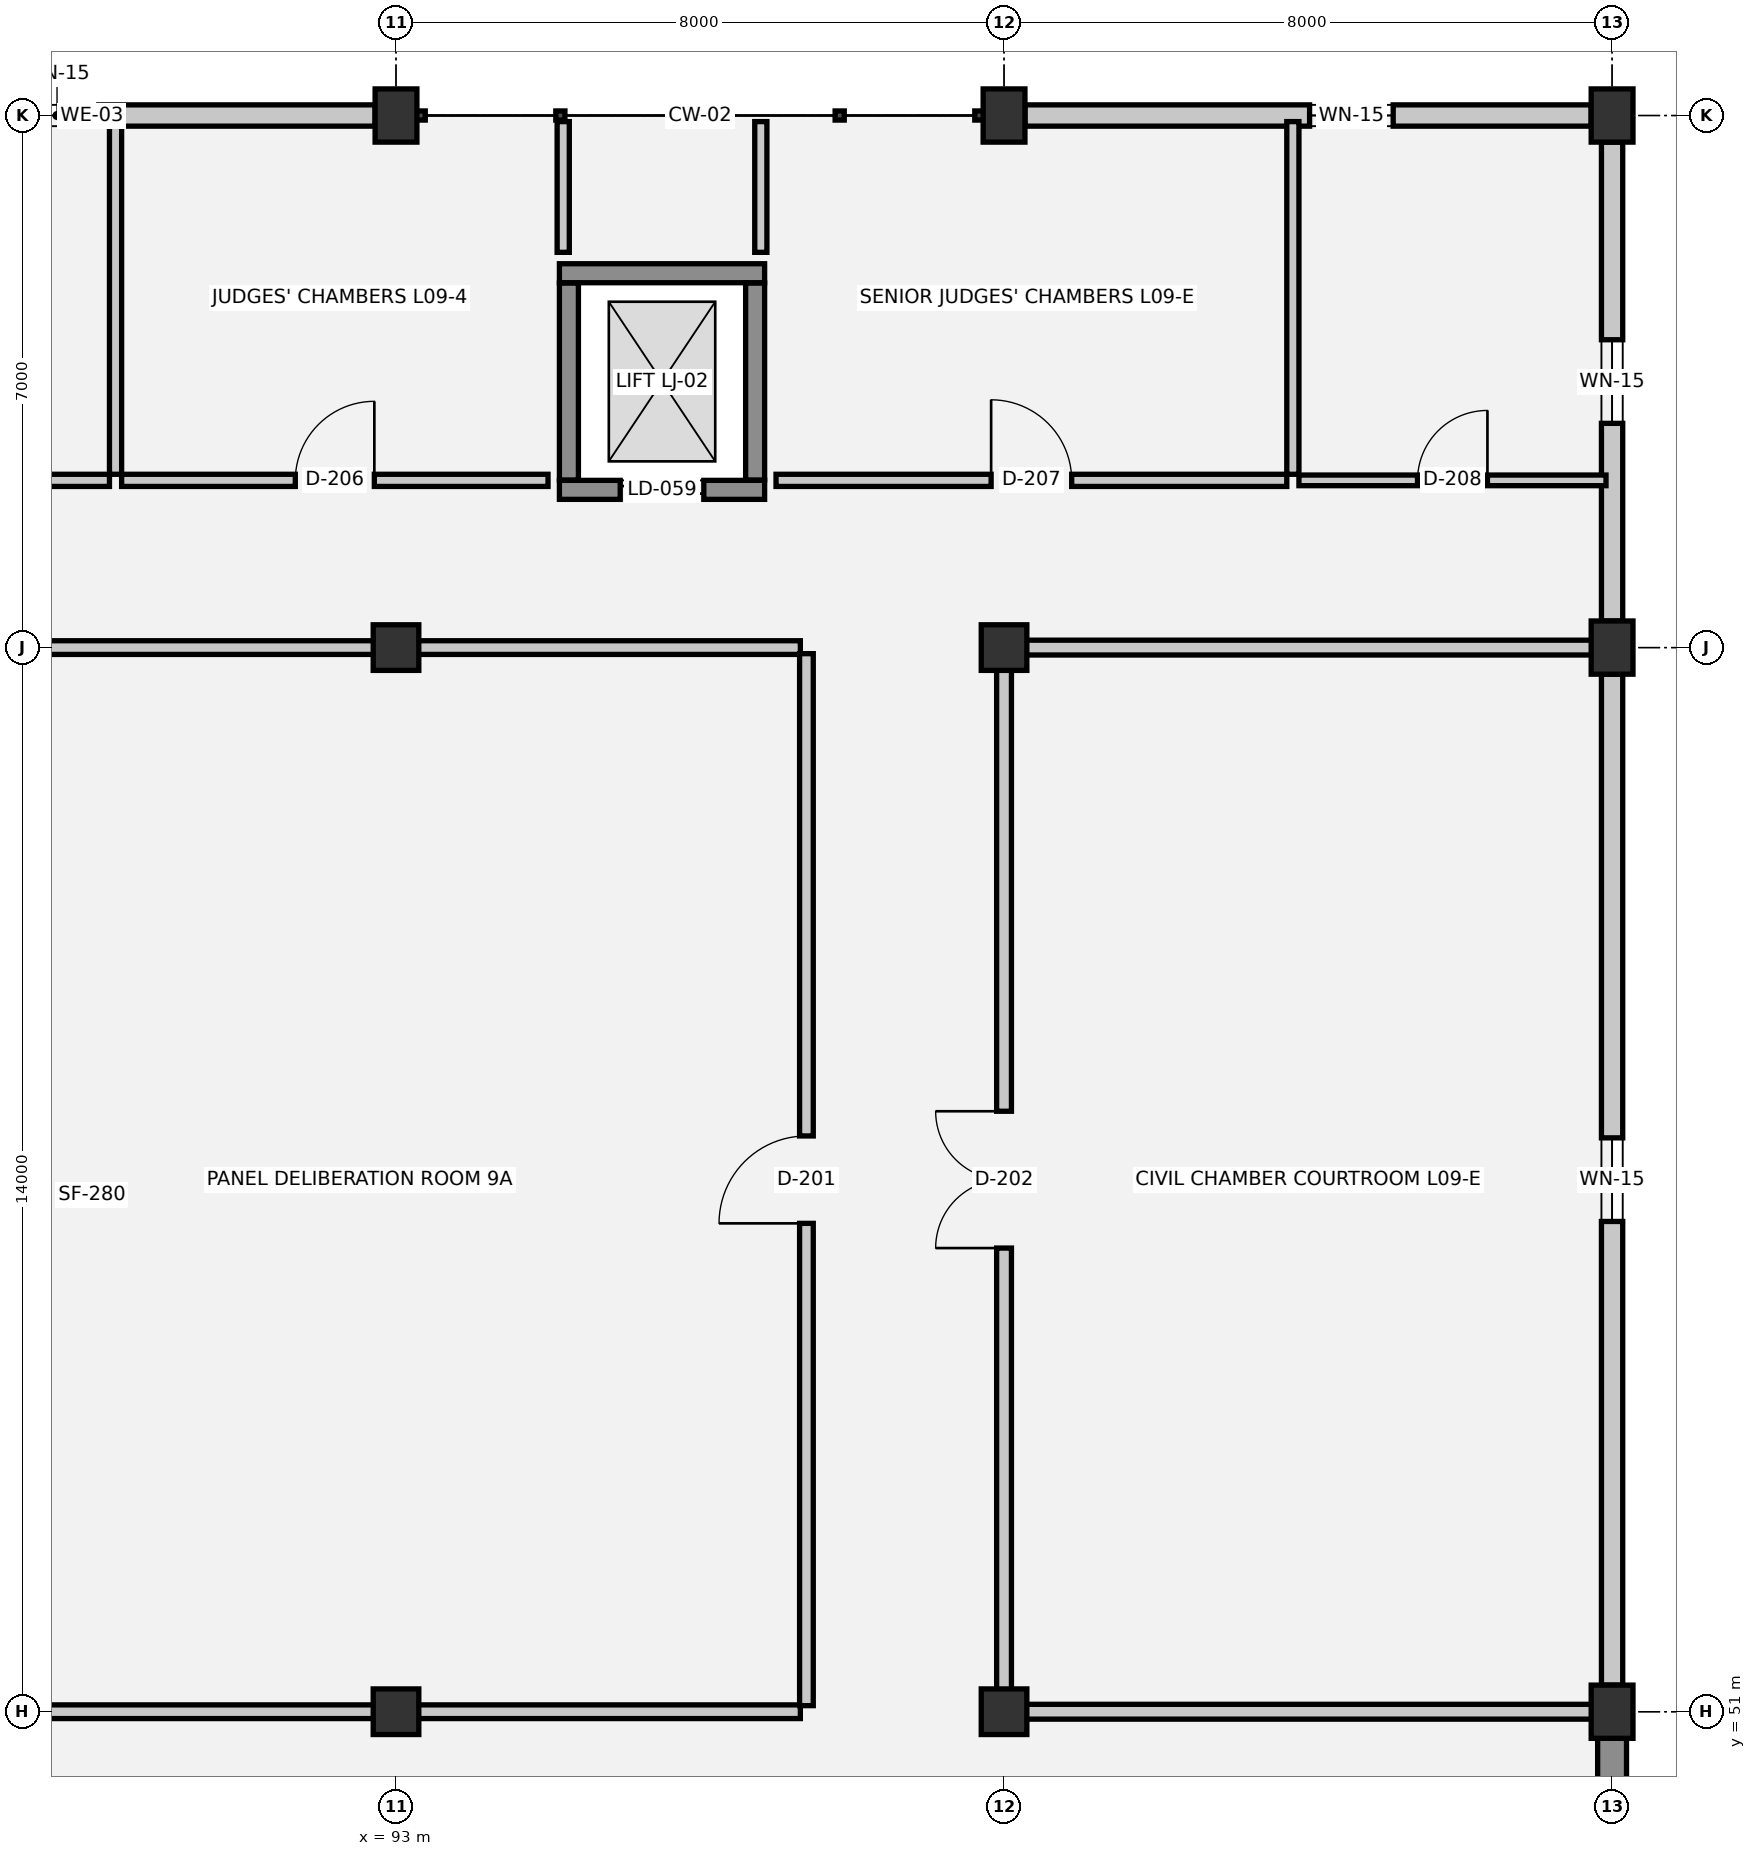
"""IFC4 building model, lengths in metres.
Left out: names, types, materials, properties, quantities, classifications, styles, units other than length and angle.
Written with IfcOpenShell. Run it as: python <this file> out.ifc"""

import sys

from ifc_helpers import new_model, si_unit, direction, frame, frame_2d, origin, origin_2d, place, context, subcontext, project, spatial, rectangle, extrude, element, fill, save


model = new_model("IFC4")
c1 = context("Model", 3, precision=1e-05, world=origin(), true_north=direction((0.0, 1.0)))
c2 = subcontext(c1, "Body", "Model", "MODEL_VIEW")
j1 = project(units=[si_unit("LENGTHUNIT", "METRE"), si_unit("PLANEANGLEUNIT", "RADIAN")], contexts=[c1])
p1 = place(None, origin())
s1 = spatial("IfcSite", under=j1, at=p1, CompositionType="ELEMENT")
p2 = place(p1, origin())
s2 = spatial("IfcBuilding", under=s1, at=p2, CompositionType="ELEMENT")
p3 = place(p2, frame((0.0, 0.0, 33.3)))
s3 = spatial("IfcBuildingStorey", under=s2, at=p3, CompositionType="ELEMENT", Elevation=33.3)
for number, where, z_axis, x_axis in (
    (1, (93.0, 51.0, 0.0), (0.0, 0.0, 1.0), (1.0, 0.0, 0.0)),
    (2, (93.0, 65.0, 0.0), (0.0, 0.0, 1.0), (1.0, 0.0, 0.0)),
):
    element("IfcColumn", number, at=place(p3, frame(where, z_axis=z_axis, x_axis=x_axis)), inside=s3, PredefinedType="COLUMN", context=c2, shape_type="SweptSolid", body=[
        extrude(rectangle(XDim=0.6, YDim=0.6, at=origin_2d()), origin(), (0.0, 0.0, 1.0), 3.75),
    ])
p4 = place(p3, frame((93.0, 72.0, 0.0), z_axis=(0.0, 0.0, 1.0), x_axis=(1.0, 0.0, 0.0)))
e3 = element("IfcColumn", 3, at=p4, inside=s3, PredefinedType="COLUMN", context=c2, shape_type="SweptSolid", body=[
    extrude(rectangle(XDim=0.55, YDim=0.7, at=origin_2d()), origin(), (0.0, 0.0, 1.0), 3.75),
])
for number, where, z_axis, x_axis in (
    (4, (101.0, 51.0, 0.0), (0.0, 0.0, 1.0), (1.0, 0.0, 0.0)),
    (5, (101.0, 65.0, 0.0), (0.0, 0.0, 1.0), (1.0, 0.0, 0.0)),
):
    element("IfcColumn", number, at=place(p3, frame(where, z_axis=z_axis, x_axis=x_axis)), inside=s3, PredefinedType="COLUMN", context=c2, shape_type="SweptSolid", body=[
        extrude(rectangle(XDim=0.6, YDim=0.6, at=origin_2d()), origin(), (0.0, 0.0, 1.0), 3.75),
    ])
for number, where, z_axis, x_axis in (
    (6, (101.0, 72.0, 0.0), (0.0, 0.0, 1.0), (1.0, 0.0, 0.0)),
    (7, (109.0, 51.0, 0.0), (0.0, 0.0, 1.0), (1.0, 0.0, 0.0)),
    (8, (109.0, 65.0, 0.0), (0.0, 0.0, 1.0), (1.0, 0.0, 0.0)),
    (9, (109.0, 72.0, 0.0), (0.0, 0.0, 1.0), (1.0, 0.0, 0.0)),
):
    element("IfcColumn", number, at=place(p3, frame(where, z_axis=z_axis, x_axis=x_axis)), inside=s3, PredefinedType="COLUMN", context=c2, shape_type="SweptSolid", body=[
        extrude(rectangle(XDim=0.55, YDim=0.7, at=origin_2d()), origin(), (0.0, 0.0, 1.0), 3.75),
    ])
p5 = place(p3, frame((85.275, 72.0, 0.0), z_axis=(0.0, 0.0, 1.0), x_axis=(1.0, 0.0, 0.0)))
e10 = element("IfcWall", 10, at=p5, inside=s3, PredefinedType="SOLIDWALL", context=c2, shape_type="SweptSolid", body=[
    extrude(rectangle(XDim=7.45, YDim=0.28, at=frame_2d((3.725, 0.0))), origin(), (0.0, 0.0, 1.0), 2.6),
])
p6 = place(p5, frame((2.715, 0.0, 1.0)))
e11 = element("IfcOpeningElement", 11, at=p6, cuts=e10, PredefinedType="OPENING", context=c2, shape_type="SweptSolid", body=[
    extrude(rectangle(XDim=1.1, YDim=1.2, at=frame_2d((0.55, 0.6))), frame((0.0, 0.15, 0.0), z_axis=(0.0, -1.0, 0.0), x_axis=(1.0, 0.0, 0.0)), (0.0, 0.0, 1.0), 0.3),
])
p7 = place(p3, frame((101.275, 72.0, 0.0), z_axis=(0.0, 0.0, 1.0), x_axis=(1.0, 0.0, 0.0)))
e12 = element("IfcWall", 12, at=p7, inside=s3, PredefinedType="SOLIDWALL", context=c2, shape_type="SweptSolid", body=[
    extrude(rectangle(XDim=7.45, YDim=0.28, at=frame_2d((3.725, 0.0))), origin(), (0.0, 0.0, 1.0), 2.6),
])
p8 = place(p7, frame((3.745, 0.0, 1.0)))
e13 = element("IfcOpeningElement", 13, at=p8, cuts=e12, PredefinedType="OPENING", context=c2, shape_type="SweptSolid", body=[
    extrude(rectangle(XDim=1.1, YDim=1.2, at=frame_2d((0.55, 0.6))), frame((0.0, 0.15, 0.0), z_axis=(0.0, -1.0, 0.0), x_axis=(1.0, 0.0, 0.0)), (0.0, 0.0, 1.0), 0.3),
])
p9 = place(p3, frame((109.0, 71.65, 0.0), z_axis=(0.0, 0.0, 1.0), x_axis=(0.0, -1.0, 0.0)))
e14 = element("IfcWall", 14, at=p9, inside=s3, PredefinedType="SOLIDWALL", context=c2, shape_type="SweptSolid", body=[
    extrude(rectangle(XDim=6.3, YDim=0.28, at=frame_2d((3.15, 0.0))), origin(), (0.0, 0.0, 1.0), 2.6),
])
p10 = place(p9, frame((2.6, 0.0, 0.9)))
e15 = element("IfcOpeningElement", 15, at=p10, cuts=e14, PredefinedType="OPENING", context=c2, shape_type="SweptSolid", body=[
    extrude(rectangle(XDim=1.1, YDim=1.2, at=frame_2d((0.55, 0.6))), frame((0.0, 0.15, 0.0), z_axis=(0.0, -1.0, 0.0), x_axis=(1.0, 0.0, 0.0)), (0.0, 0.0, 1.0), 0.3),
])
p11 = place(p3, frame((109.0, 64.65, 0.0), z_axis=(0.0, 0.0, 1.0), x_axis=(0.0, -1.0, 0.0)))
e16 = element("IfcWall", 16, at=p11, inside=s3, PredefinedType="SOLIDWALL", context=c2, shape_type="SweptSolid", body=[
    extrude(rectangle(XDim=13.3, YDim=0.28, at=frame_2d((6.65, 0.0))), origin(), (0.0, 0.0, 1.0), 2.6),
])
p12 = place(p11, frame((6.1, 0.0, 0.9)))
e17 = element("IfcOpeningElement", 17, at=p12, cuts=e16, PredefinedType="OPENING", context=c2, shape_type="SweptSolid", body=[
    extrude(rectangle(XDim=1.1, YDim=1.2, at=frame_2d((0.55, 0.6))), frame((0.0, 0.15, 0.0), z_axis=(0.0, -1.0, 0.0), x_axis=(1.0, 0.0, 0.0)), (0.0, 0.0, 1.0), 0.3),
])
p13 = place(p3, frame((109.0, 50.65, 0.0), z_axis=(0.0, 0.0, 1.0), x_axis=(0.0, -1.0, 0.0)))
e18 = element("IfcWall", 18, at=p13, inside=s3, PredefinedType="STANDARD", context=c2, shape_type="SweptSolid", body=[
    extrude(rectangle(XDim=6.3, YDim=0.38, at=frame_2d((3.15, 0.0))), origin(), (0.0, 0.0, 1.0), 2.6),
])
p14 = place(p3, frame((95.15, 67.075, 0.0), z_axis=(0.0, 0.0, 1.0), x_axis=(1.0, 0.0, 0.0)))
e19 = element("IfcWall", 19, at=p14, inside=s3, PredefinedType="SHEAR", context=c2, shape_type="SweptSolid", body=[
    extrude(rectangle(XDim=2.7, YDim=0.25, at=frame_2d((1.35, 0.0))), origin(), (0.0, 0.0, 1.0), 3.75),
])
p15 = place(p14, frame((0.8, 0.0, 0.0)))
e20 = element("IfcOpeningElement", 20, at=p15, cuts=e19, PredefinedType="OPENING", context=c2, shape_type="SweptSolid", body=[
    extrude(rectangle(XDim=1.1, YDim=2.15, at=frame_2d((0.55, 1.075))), frame((0.0, 0.135, 0.0), z_axis=(0.0, -1.0, 0.0), x_axis=(1.0, 0.0, 0.0)), (0.0, 0.0, 1.0), 0.27),
])
p16 = place(p3, frame((97.85, 69.925, 0.0), z_axis=(0.0, 0.0, 1.0), x_axis=(-1.0, 0.0, 0.0)))
e21 = element("IfcWall", 21, at=p16, inside=s3, PredefinedType="SHEAR", context=c2, shape_type="SweptSolid", body=[
    extrude(rectangle(XDim=2.7, YDim=0.25, at=frame_2d((1.35, 0.0))), origin(), (0.0, 0.0, 1.0), 3.75),
])
for number, where, z_axis, x_axis in (
    (22, (95.275, 69.795, 0.0), (0.0, 0.0, 1.0), (0.0, -1.0, 0.0)),
    (23, (97.725, 67.205, 0.0), (0.0, 0.0, 1.0), (0.0, 1.0, 0.0)),
):
    element("IfcWall", number, at=place(p3, frame(where, z_axis=z_axis, x_axis=x_axis)), inside=s3, PredefinedType="SHEAR", context=c2, shape_type="SweptSolid", body=[
        extrude(rectangle(XDim=2.59, YDim=0.25, at=frame_2d((1.295, 0.0))), origin(), (0.0, 0.0, 1.0), 3.75),
    ])
p17 = place(p3, frame((86.72, 51.0, 0.0), z_axis=(0.0, 0.0, 1.0), x_axis=(1.0, 0.0, 0.0)))
e24 = element("IfcWall", 24, at=p17, inside=s3, PredefinedType="PARTITIONING", context=c2, shape_type="SweptSolid", body=[
    extrude(rectangle(XDim=11.6, YDim=0.18, at=frame_2d((5.8, 0.0))), origin(), (0.0, 0.0, 1.0), 2.82),
])
p18 = place(p3, frame((101.08, 51.0, 0.0), z_axis=(0.0, 0.0, 1.0), x_axis=(1.0, 0.0, 0.0)))
e25 = element("IfcWall", 25, at=p18, inside=s3, PredefinedType="PARTITIONING", context=c2, shape_type="SweptSolid", body=[
    extrude(rectangle(XDim=7.84, YDim=0.195, at=frame_2d((3.92, 0.0))), origin(), (0.0, 0.0, 1.0), 2.82),
])
p19 = place(p3, frame((86.72, 65.0, 0.0), z_axis=(0.0, 0.0, 1.0), x_axis=(1.0, 0.0, 0.0)))
e26 = element("IfcWall", 26, at=p19, inside=s3, PredefinedType="PARTITIONING", context=c2, shape_type="SweptSolid", body=[
    extrude(rectangle(XDim=11.6, YDim=0.18, at=frame_2d((5.8, 0.0))), origin(), (0.0, 0.0, 1.0), 2.82),
])
p20 = place(p3, frame((101.08, 65.0, 0.0), z_axis=(0.0, 0.0, 1.0), x_axis=(1.0, 0.0, 0.0)))
e27 = element("IfcWall", 27, at=p20, inside=s3, PredefinedType="PARTITIONING", context=c2, shape_type="SweptSolid", body=[
    extrude(rectangle(XDim=7.84, YDim=0.195, at=frame_2d((3.92, 0.0))), origin(), (0.0, 0.0, 1.0), 2.82),
])
p21 = place(p3, frame((81.74, 67.2, 0.0), z_axis=(0.0, 0.0, 1.0), x_axis=(1.0, 0.0, 0.0)))
e28 = element("IfcWall", 28, at=p21, inside=s3, PredefinedType="PARTITIONING", context=c2, shape_type="SweptSolid", body=[
    extrude(rectangle(XDim=7.49, YDim=0.16, at=frame_2d((3.745, 0.0))), origin(), (0.0, 0.0, 1.0), 3.39),
])
p22 = place(p21, frame((3.235, 0.0, 0.0)))
e29 = element("IfcOpeningElement", 29, at=p22, cuts=e28, PredefinedType="OPENING", context=c2, shape_type="SweptSolid", body=[
    extrude(rectangle(XDim=1.02, YDim=2.15, at=frame_2d((0.51, 1.075))), frame((0.0, 0.09, 0.0), z_axis=(0.0, -1.0, 0.0), x_axis=(1.0, 0.0, 0.0)), (0.0, 0.0, 1.0), 0.18),
])
p23 = place(p3, frame((89.39, 67.2, 0.0), z_axis=(0.0, 0.0, 1.0), x_axis=(1.0, 0.0, 0.0)))
e30 = element("IfcWall", 30, at=p23, inside=s3, PredefinedType="PARTITIONING", context=c2, shape_type="SweptSolid", body=[
    extrude(rectangle(XDim=5.61, YDim=0.16, at=frame_2d((2.805, 0.0))), origin(), (0.0, 0.0, 1.0), 3.39),
])
p24 = place(p23, frame((2.285, 0.0, 0.0)))
e31 = element("IfcOpeningElement", 31, at=p24, cuts=e30, PredefinedType="OPENING", context=c2, shape_type="SweptSolid", body=[
    extrude(rectangle(XDim=1.04, YDim=2.15, at=frame_2d((0.52, 1.075))), frame((0.0, 0.09, 0.0), z_axis=(0.0, -1.0, 0.0), x_axis=(1.0, 0.0, 0.0)), (0.0, 0.0, 1.0), 0.18),
])
p25 = place(p3, frame((98.0, 67.2, 0.0), z_axis=(0.0, 0.0, 1.0), x_axis=(1.0, 0.0, 0.0)))
e32 = element("IfcWall", 32, at=p25, inside=s3, PredefinedType="PARTITIONING", context=c2, shape_type="SweptSolid", body=[
    extrude(rectangle(XDim=6.72, YDim=0.16, at=frame_2d((3.36, 0.0))), origin(), (0.0, 0.0, 1.0), 3.39),
])
p26 = place(p25, frame((2.83, 0.0, 0.0)))
e33 = element("IfcOpeningElement", 33, at=p26, cuts=e32, PredefinedType="OPENING", context=c2, shape_type="SweptSolid", body=[
    extrude(rectangle(XDim=1.06, YDim=2.2, at=frame_2d((0.53, 1.1))), frame((0.0, 0.09, 0.0), z_axis=(0.0, -1.0, 0.0), x_axis=(1.0, 0.0, 0.0)), (0.0, 0.0, 1.0), 0.18),
])
p27 = place(p3, frame((104.88, 67.2, 0.0), z_axis=(0.0, 0.0, 1.0), x_axis=(1.0, 0.0, 0.0)))
e34 = element("IfcWall", 34, at=p27, inside=s3, PredefinedType="PLUMBINGWALL", context=c2, shape_type="SweptSolid", body=[
    extrude(rectangle(XDim=4.04, YDim=0.14, at=frame_2d((2.02, 0.0))), origin(), (0.0, 0.0, 1.0), 3.39),
])
p28 = place(p27, frame((1.56, 0.0, 0.0)))
e35 = element("IfcOpeningElement", 35, at=p28, cuts=e34, PredefinedType="OPENING", context=c2, shape_type="SweptSolid", body=[
    extrude(rectangle(XDim=0.92, YDim=2.1, at=frame_2d((0.46, 1.05))), frame((0.0, 0.08, 0.0), z_axis=(0.0, -1.0, 0.0), x_axis=(1.0, 0.0, 0.0)), (0.0, 0.0, 1.0), 0.16),
])
p29 = place(p3, frame((89.31, 67.28, 0.0), z_axis=(0.0, 0.0, 1.0), x_axis=(0.0, 1.0, 0.0)))
e36 = element("IfcWall", 36, at=p29, inside=s3, PredefinedType="PARTITIONING", context=c2, shape_type="SweptSolid", body=[
    extrude(rectangle(XDim=4.64, YDim=0.16, at=frame_2d((2.32, 0.0))), origin(), (0.0, 0.0, 1.0), 3.39),
])
for number, where, z_axis, x_axis in (
    (37, (95.2, 70.2, 0.0), (0.0, 0.0, 1.0), (0.0, 1.0, 0.0)),
    (38, (97.8, 70.2, 0.0), (0.0, 0.0, 1.0), (0.0, 1.0, 0.0)),
):
    element("IfcWall", number, at=place(p3, frame(where, z_axis=z_axis, x_axis=x_axis)), inside=s3, PredefinedType="PARTITIONING", context=c2, shape_type="SweptSolid", body=[
        extrude(rectangle(XDim=1.72, YDim=0.16, at=frame_2d((0.86, 0.0))), origin(), (0.0, 0.0, 1.0), 3.39),
    ])
p30 = place(p3, frame((98.4, 51.08, 0.0), z_axis=(0.0, 0.0, 1.0), x_axis=(0.0, 1.0, 0.0)))
e39 = element("IfcWall", 39, at=p30, inside=s3, PredefinedType="PARTITIONING", context=c2, shape_type="SweptSolid", body=[
    extrude(rectangle(XDim=13.84, YDim=0.18, at=frame_2d((6.92, 0.0))), origin(), (0.0, 0.0, 1.0), 3.39),
])
p31 = place(p30, frame((6.345, 0.0, 0.0)))
e40 = element("IfcOpeningElement", 40, at=p31, cuts=e39, PredefinedType="OPENING", context=c2, shape_type="SweptSolid", body=[
    extrude(rectangle(XDim=1.15, YDim=2.2, at=frame_2d((0.575, 1.1))), frame((0.0, 0.1, 0.0), z_axis=(0.0, -1.0, 0.0), x_axis=(1.0, 0.0, 0.0)), (0.0, 0.0, 1.0), 0.2),
])
p32 = place(p3, frame((101.0, 51.08, 0.0), z_axis=(0.0, 0.0, 1.0), x_axis=(0.0, 1.0, 0.0)))
e41 = element("IfcWall", 41, at=p32, inside=s3, PredefinedType="PARTITIONING", context=c2, shape_type="SweptSolid", body=[
    extrude(rectangle(XDim=13.84, YDim=0.195, at=frame_2d((6.92, 0.0))), origin(), (0.0, 0.0, 1.0), 2.62),
])
p33 = place(p32, frame((6.02, 0.0, 0.0)))
e42 = element("IfcOpeningElement", 42, at=p33, cuts=e41, PredefinedType="OPENING", context=c2, shape_type="SweptSolid", body=[
    extrude(rectangle(XDim=1.8, YDim=2.3, at=frame_2d((0.9, 1.15))), frame((0.0, 0.107, 0.0), z_axis=(0.0, -1.0, 0.0), x_axis=(1.0, 0.0, 0.0)), (0.0, 0.0, 1.0), 0.215),
])
p34 = place(p3, frame((104.8, 67.28, 0.0), z_axis=(0.0, 0.0, 1.0), x_axis=(0.0, 1.0, 0.0)))
e43 = element("IfcWall", 43, at=p34, inside=s3, PredefinedType="PARTITIONING", context=c2, shape_type="SweptSolid", body=[
    extrude(rectangle(XDim=4.64, YDim=0.16, at=frame_2d((2.32, 0.0))), origin(), (0.0, 0.0, 1.0), 3.39),
])
p35 = place(p6, origin())
e44 = element("IfcWindow", 44, at=p35, inside=s3, PartitioningType="SINGLE_PANEL", PredefinedType="WINDOW", context=c2, shape_type="SweptSolid", body=[
    extrude(rectangle(XDim=1.1, YDim=1.2, at=frame_2d((0.55, 0.6))), frame((0.0, 0.03, 0.0), z_axis=(0.0, -1.0, 0.0), x_axis=(1.0, 0.0, 0.0)), (0.0, 0.0, 1.0), 0.06),
])
fill(e11, e44)
p36 = place(p8, origin())
e45 = element("IfcWindow", 45, at=p36, inside=s3, PartitioningType="SINGLE_PANEL", PredefinedType="WINDOW", context=c2, shape_type="SweptSolid", body=[
    extrude(rectangle(XDim=1.1, YDim=1.2, at=frame_2d((0.55, 0.6))), frame((0.0, 0.03, 0.0), z_axis=(0.0, -1.0, 0.0), x_axis=(1.0, 0.0, 0.0)), (0.0, 0.0, 1.0), 0.06),
])
fill(e13, e45)
p37 = place(p10, origin())
e46 = element("IfcWindow", 46, at=p37, inside=s3, PartitioningType="SINGLE_PANEL", PredefinedType="WINDOW", context=c2, shape_type="SweptSolid", body=[
    extrude(rectangle(XDim=1.1, YDim=1.2, at=frame_2d((0.55, 0.6))), frame((0.0, 0.03, 0.0), z_axis=(0.0, -1.0, 0.0), x_axis=(1.0, 0.0, 0.0)), (0.0, 0.0, 1.0), 0.06),
])
fill(e15, e46)
p38 = place(p12, origin())
e47 = element("IfcWindow", 47, at=p38, inside=s3, PartitioningType="SINGLE_PANEL", PredefinedType="WINDOW", context=c2, shape_type="SweptSolid", body=[
    extrude(rectangle(XDim=1.1, YDim=1.2, at=frame_2d((0.55, 0.6))), frame((0.0, 0.03, 0.0), z_axis=(0.0, -1.0, 0.0), x_axis=(1.0, 0.0, 0.0)), (0.0, 0.0, 1.0), 0.06),
])
fill(e17, e47)
p39 = place(p15, origin())
e48 = element("IfcDoor", 48, at=p39, inside=s3, OperationType="DOUBLE_DOOR_SLIDING", PredefinedType="DOOR", context=c2, shape_type="SweptSolid", body=[
    extrude(rectangle(XDim=1.1, YDim=2.15, at=frame_2d((0.55, 1.075))), frame((0.0, 0.025, 0.0), z_axis=(0.0, -1.0, 0.0), x_axis=(1.0, 0.0, 0.0)), (0.0, 0.0, 1.0), 0.05),
])
fill(e20, e48)
p40 = place(p31, origin())
e49 = element("IfcDoor", 49, at=p40, inside=s3, OperationType="SINGLE_SWING_LEFT", PredefinedType="DOOR", context=c2, shape_type="SweptSolid", body=[
    extrude(rectangle(XDim=1.15, YDim=2.2, at=frame_2d((0.575, 1.1))), frame((0.0, 0.025, 0.0), z_axis=(0.0, -1.0, 0.0), x_axis=(1.0, 0.0, 0.0)), (0.0, 0.0, 1.0), 0.05),
])
fill(e40, e49)
p41 = place(p33, origin())
e50 = element("IfcDoor", 50, at=p41, inside=s3, OperationType="DOUBLE_DOOR_SINGLE_SWING", PredefinedType="DOOR", context=c2, shape_type="SweptSolid", body=[
    extrude(rectangle(XDim=1.8, YDim=2.3, at=frame_2d((0.9, 1.15))), frame((0.0, 0.025, 0.0), z_axis=(0.0, -1.0, 0.0), x_axis=(1.0, 0.0, 0.0)), (0.0, 0.0, 1.0), 0.05),
])
fill(e42, e50)
p42 = place(p24, origin())
e51 = element("IfcDoor", 51, at=p42, inside=s3, OperationType="SINGLE_SWING_RIGHT", PredefinedType="DOOR", context=c2, shape_type="SweptSolid", body=[
    extrude(rectangle(XDim=1.04, YDim=2.15, at=frame_2d((0.52, 1.075))), frame((0.0, 0.025, 0.0), z_axis=(0.0, -1.0, 0.0), x_axis=(1.0, 0.0, 0.0)), (0.0, 0.0, 1.0), 0.05),
])
fill(e31, e51)
p43 = place(p26, origin())
e52 = element("IfcDoor", 52, at=p43, inside=s3, OperationType="SINGLE_SWING_LEFT", PredefinedType="DOOR", context=c2, shape_type="SweptSolid", body=[
    extrude(rectangle(XDim=1.06, YDim=2.2, at=frame_2d((0.53, 1.1))), frame((0.0, 0.025, 0.0), z_axis=(0.0, -1.0, 0.0), x_axis=(1.0, 0.0, 0.0)), (0.0, 0.0, 1.0), 0.05),
])
fill(e33, e52)
p44 = place(p28, origin())
e53 = element("IfcDoor", 53, at=p44, inside=s3, OperationType="SINGLE_SWING_RIGHT", PredefinedType="DOOR", context=c2, shape_type="SweptSolid", body=[
    extrude(rectangle(XDim=0.92, YDim=2.1, at=frame_2d((0.46, 1.05))), frame((0.0, 0.025, 0.0), z_axis=(0.0, -1.0, 0.0), x_axis=(1.0, 0.0, 0.0)), (0.0, 0.0, 1.0), 0.05),
])
fill(e35, e53)
save(model, sys.argv[1])
